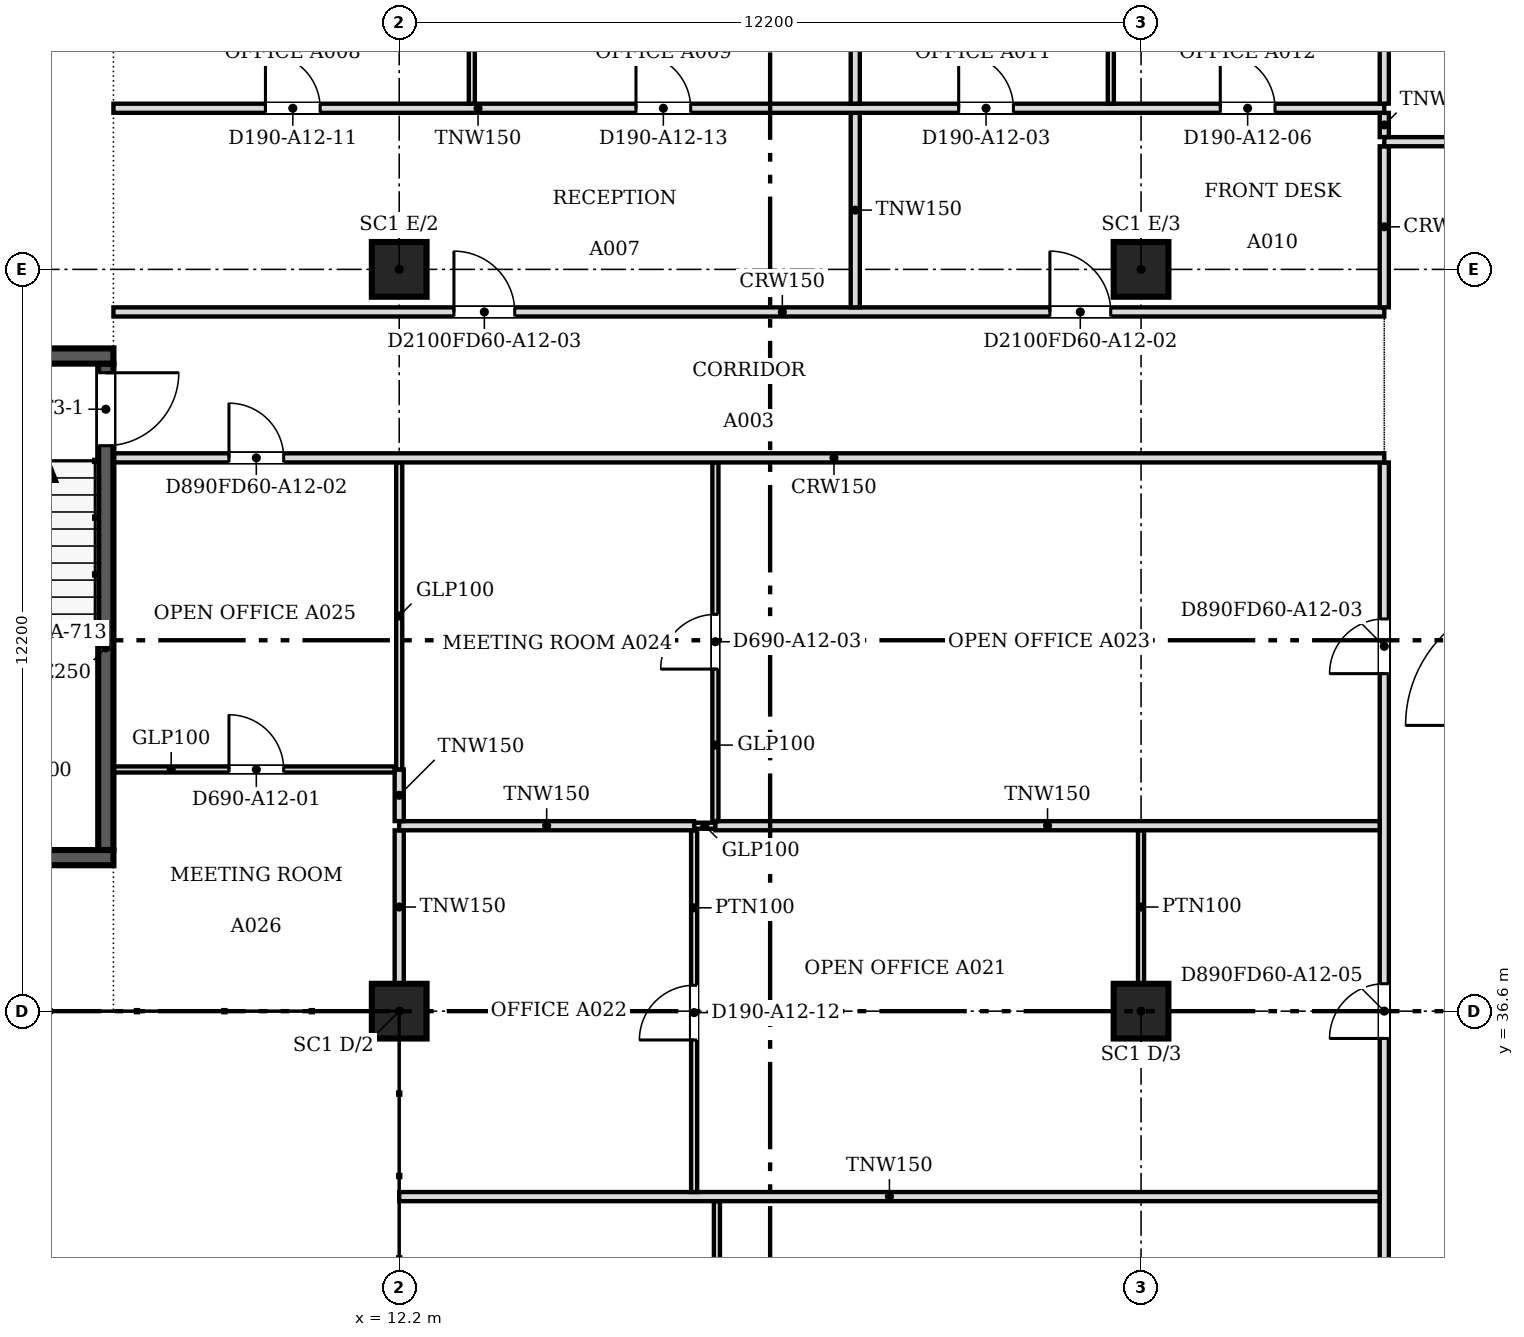
"""IFC4 building model, lengths in metres.
Left out: names, types, materials, properties, quantities, classifications, styles, units other than length and angle.
Written with IfcOpenShell. Run it as: python <this file> out.ifc"""

import sys

from ifc_helpers import new_model, si_unit, direction, frame, frame_2d, origin, origin_2d, place, context, subcontext, project, spatial, rectangle, extrude, source, transform, mapped, element, fill, save


model = new_model("IFC4")
c1 = context("Model", 3, precision=1e-05, world=origin(), true_north=direction((0.0, 1.0)))
c2 = subcontext(c1, "Body", "Model", "MODEL_VIEW")
j1 = project(units=[si_unit("LENGTHUNIT", "METRE"), si_unit("PLANEANGLEUNIT", "RADIAN")], contexts=[c1])
p1 = place(None, origin())
s1 = spatial("IfcSite", under=j1, at=p1, CompositionType="ELEMENT")
p2 = place(p1, origin())
s2 = spatial("IfcBuilding", under=s1, at=p2, CompositionType="ELEMENT")
p3 = place(p2, frame((0.0, 0.0, 135.4)))
s3 = spatial("IfcBuildingStorey", under=s2, at=p3, CompositionType="ELEMENT", Elevation=135.4)
for number, where, z_axis, x_axis in (
    (1, (12.2, 36.6, 0.0), (0.0, 0.0, 1.0), (1.0, 0.0, 0.0)),
    (2, (12.2, 48.8, 0.0), (0.0, 0.0, 1.0), (1.0, 0.0, 0.0)),
    (3, (24.4, 36.6, 0.0), (0.0, 0.0, 1.0), (1.0, 0.0, 0.0)),
    (4, (24.4, 48.8, 0.0), (0.0, 0.0, 1.0), (1.0, 0.0, 0.0)),
):
    element("IfcColumn", number, at=place(p3, frame(where, z_axis=z_axis, x_axis=x_axis)), inside=s3, PredefinedType="COLUMN", context=c2, shape_type="SweptSolid", body=[
        extrude(rectangle(XDim=0.9, YDim=0.9, at=origin_2d()), origin(), (0.0, 0.0, 1.0), 3.6),
    ])
for number, where, z_axis, x_axis in (
    (5, (7.5, 39.125, 0.0), (0.0, 0.0, 1.0), (-1.0, 0.0, 0.0)),
    (6, (3.6, 47.375, 0.0), (0.0, 0.0, 1.0), (1.0, 0.0, 0.0)),
):
    element("IfcWall", number, at=place(p3, frame(where, z_axis=z_axis, x_axis=x_axis)), inside=s3, PredefinedType="SOLIDWALL", context=c2, shape_type="SweptSolid", body=[
        extrude(rectangle(XDim=3.9, YDim=0.25, at=frame_2d((1.95, 0.0))), origin(), (0.0, 0.0, 1.0), 3.8),
    ])
p4 = place(p3, frame((7.375, 47.25, 0.0), z_axis=(0.0, 0.0, 1.0), x_axis=(0.0, -1.0, 0.0)))
e7 = element("IfcWall", 7, at=p4, inside=s3, PredefinedType="SOLIDWALL", context=c2, shape_type="SweptSolid", body=[
    extrude(rectangle(XDim=8.0, YDim=0.25, at=frame_2d((4.0, 0.0))), origin(), (0.0, 0.0, 1.0), 3.8),
])
m1 = source(origin(), c2, "Body", "SweptSolid", [
    extrude(rectangle(XDim=1.2, YDim=2.1, at=frame_2d((0.6, 1.05))), frame((0.0, 0.135, 0.0), z_axis=(0.0, -1.0, 0.0), x_axis=(1.0, 0.0, 0.0)), (0.0, 0.0, 1.0), 0.27),
])
p5 = place(p4, frame((0.15, 0.0, 0.0)))
e8 = element("IfcOpeningElement", 8, at=p5, cuts=e7, PredefinedType="OPENING", context=c2, shape_type="MappedRepresentation", body=[
    mapped(m1, transform((0.0, 0.0, 0.0), scale=1.0)),
])
p6 = place(p3, frame((28.4, 18.8, 0.0), z_axis=(0.0, 0.0, 1.0), x_axis=(0.0, 1.0, 0.0)))
e9 = element("IfcWall", 9, at=p6, inside=s3, PredefinedType="PARTITIONING", context=c2, shape_type="SweptSolid", body=[
    extrude(rectangle(XDim=26.824, YDim=0.15, at=frame_2d((13.412, 0.0))), origin(), (0.0, 0.0, 1.0), 3.067),
])
m2 = source(origin(), c2, "Body", "SweptSolid", [
    extrude(rectangle(XDim=0.9, YDim=2.1, at=frame_2d((0.45, 1.05))), frame((0.0, 0.085, 0.0), z_axis=(0.0, -1.0, 0.0), x_axis=(1.0, 0.0, 0.0)), (0.0, 0.0, 1.0), 0.17),
])
p7 = place(p6, frame((1.3, 0.0, 0.0)))
e10 = element("IfcOpeningElement", 10, at=p7, cuts=e9, PredefinedType="OPENING", context=c2, shape_type="MappedRepresentation", body=[
    mapped(m2, transform((0.0, 0.0, 0.0), scale=1.0)),
])
p8 = place(p6, frame((23.351, 0.0, 0.0)))
e11 = element("IfcOpeningElement", 11, at=p8, cuts=e9, PredefinedType="OPENING", context=c2, shape_type="MappedRepresentation", body=[
    mapped(m2, transform((0.0, 0.0, 0.0), scale=1.0)),
])
p9 = place(p6, frame((17.351, 0.0, 0.0)))
e12 = element("IfcOpeningElement", 12, at=p9, cuts=e9, PredefinedType="OPENING", context=c2, shape_type="MappedRepresentation", body=[
    mapped(m2, transform((0.0, 0.0, 0.0), scale=1.0)),
])
p10 = place(p6, frame((9.7, 0.0, 0.0)))
e13 = element("IfcOpeningElement", 13, at=p10, cuts=e9, PredefinedType="OPENING", context=c2, shape_type="MappedRepresentation", body=[
    mapped(m2, transform((0.0, 0.0, 0.0), scale=1.0)),
])
p11 = place(p3, frame((17.425, 28.871, 0.0), z_axis=(0.0, 0.0, 1.0), x_axis=(0.0, 1.0, 0.0)))
e14 = element("IfcWall", 14, at=p11, inside=s3, PredefinedType="PARTITIONING", context=c2, shape_type="SweptSolid", body=[
    extrude(rectangle(XDim=4.603, YDim=0.1, at=frame_2d((2.301, 0.0))), origin(), (0.0, 0.0, 1.0), 3.067),
])
m3 = source(origin(), c2, "Body", "SweptSolid", [
    extrude(rectangle(XDim=0.9, YDim=2.1, at=frame_2d((0.45, 1.05))), frame((0.0, 0.06, 0.0), z_axis=(0.0, -1.0, 0.0), x_axis=(1.0, 0.0, 0.0)), (0.0, 0.0, 1.0), 0.12),
])
p12 = place(p11, frame((1.9, 0.0, 0.0)))
e15 = element("IfcOpeningElement", 15, at=p12, cuts=e14, PredefinedType="OPENING", context=c2, shape_type="MappedRepresentation", body=[
    mapped(m3, transform((0.0, 0.0, 0.0), scale=1.0)),
])
p13 = place(p3, frame((12.2, 33.55, 0.0), z_axis=(0.0, 0.0, 1.0), x_axis=(1.0, 0.0, 0.0)))
e16 = element("IfcWall", 16, at=p13, inside=s3, PredefinedType="PARTITIONING", context=c2, shape_type="SweptSolid", body=[
    extrude(rectangle(XDim=16.124, YDim=0.15, at=frame_2d((8.062, 0.0))), origin(), (0.0, 0.0, 1.0), 3.067),
])
p14 = place(p3, frame((17.05, 33.626, 0.0), z_axis=(0.0, 0.0, 1.0), x_axis=(0.0, 1.0, 0.0)))
e17 = element("IfcWall", 17, at=p14, inside=s3, PredefinedType="PARTITIONING", context=c2, shape_type="SweptSolid", body=[
    extrude(rectangle(XDim=5.948, YDim=0.1, at=frame_2d((2.974, 0.0))), origin(), (0.0, 0.0, 1.0), 3.067),
])
p15 = place(p14, frame((2.5, 0.0, 0.0)))
e18 = element("IfcOpeningElement", 18, at=p15, cuts=e17, PredefinedType="OPENING", context=c2, shape_type="MappedRepresentation", body=[
    mapped(m3, transform((0.0, 0.0, 0.0), scale=1.0)),
])
p16 = place(p3, frame((12.2, 37.051, 0.0), z_axis=(0.0, 0.0, 1.0), x_axis=(0.0, 1.0, 0.0)))
e19 = element("IfcWall", 19, at=p16, inside=s3, PredefinedType="PARTITIONING", context=c2, shape_type="SweptSolid", body=[
    extrude(rectangle(XDim=2.523, YDim=0.15, at=frame_2d((1.261, 0.0))), origin(), (0.0, 0.0, 1.0), 3.067),
])
p17 = place(p3, frame((24.4, 37.05, 0.0), z_axis=(0.0, 0.0, 1.0), x_axis=(0.0, 1.0, 0.0)))
e20 = element("IfcWall", 20, at=p17, inside=s3, PredefinedType="PARTITIONING", context=c2, shape_type="SweptSolid", body=[
    extrude(rectangle(XDim=2.525, YDim=0.1, at=frame_2d((1.262, 0.0))), origin(), (0.0, 0.0, 1.0), 3.067),
])
p18 = place(p3, frame((12.2, 39.65, 0.0), z_axis=(0.0, 0.0, 1.0), x_axis=(1.0, 0.0, 0.0)))
e21 = element("IfcWall", 21, at=p18, inside=s3, PredefinedType="PARTITIONING", context=c2, shape_type="SweptSolid", body=[
    extrude(rectangle(XDim=4.85, YDim=0.15, at=frame_2d((2.425, 0.0))), origin(), (0.0, 0.0, 1.0), 3.067),
])
p19 = place(p3, frame((17.051, 39.65, 0.0), z_axis=(0.0, 0.0, 1.0), x_axis=(1.0, 0.0, 0.0)))
e22 = element("IfcWall", 22, at=p19, inside=s3, PredefinedType="PARTITIONING", context=c2, shape_type="SweptSolid", body=[
    extrude(rectangle(XDim=0.348, YDim=0.1, at=frame_2d((0.174, 0.0))), origin(), (0.0, 0.0, 1.0), 3.067),
])
p20 = place(p3, frame((17.4, 39.65, 0.0), z_axis=(0.0, 0.0, 1.0), x_axis=(1.0, 0.0, 0.0)))
e23 = element("IfcWall", 23, at=p20, inside=s3, PredefinedType="PARTITIONING", context=c2, shape_type="SweptSolid", body=[
    extrude(rectangle(XDim=10.924, YDim=0.15, at=frame_2d((5.462, 0.0))), origin(), (0.0, 0.0, 1.0), 3.067),
])
p21 = place(p3, frame((12.2, 39.726, 0.0), z_axis=(0.0, 0.0, 1.0), x_axis=(0.0, 1.0, 0.0)))
e24 = element("IfcWall", 24, at=p21, inside=s3, PredefinedType="PARTITIONING", context=c2, shape_type="SweptSolid", body=[
    extrude(rectangle(XDim=0.849, YDim=0.15, at=frame_2d((0.424, 0.0))), origin(), (0.0, 0.0, 1.0), 3.067),
])
p22 = place(p3, frame((17.4, 39.726, 0.0), z_axis=(0.0, 0.0, 1.0), x_axis=(0.0, 1.0, 0.0)))
e25 = element("IfcWall", 25, at=p22, inside=s3, PredefinedType="PARTITIONING", context=c2, shape_type="SweptSolid", body=[
    extrude(rectangle(XDim=5.898, YDim=0.1, at=frame_2d((2.949, 0.0))), origin(), (0.0, 0.0, 1.0), 3.067),
])
p23 = place(p22, frame((2.5, 0.0, 0.0)))
e26 = element("IfcOpeningElement", 26, at=p23, cuts=e25, PredefinedType="OPENING", context=c2, shape_type="MappedRepresentation", body=[
    mapped(m3, transform((0.0, 0.0, 0.0), scale=1.0)),
])
p24 = place(p3, frame((12.124, 40.575, 0.0), z_axis=(0.0, 0.0, 1.0), x_axis=(-1.0, 0.0, 0.0)))
e27 = element("IfcWall", 27, at=p24, inside=s3, PredefinedType="PARTITIONING", context=c2, shape_type="SweptSolid", body=[
    extrude(rectangle(XDim=4.624, YDim=0.1, at=frame_2d((2.312, 0.0))), origin(), (0.0, 0.0, 1.0), 3.067),
])
p25 = place(p24, frame((1.824, 0.0, 0.0)))
e28 = element("IfcOpeningElement", 28, at=p25, cuts=e27, PredefinedType="OPENING", context=c2, shape_type="MappedRepresentation", body=[
    mapped(m3, transform((0.0, 0.0, 0.0), scale=1.0)),
])
p26 = place(p3, frame((12.2, 40.576, 0.0), z_axis=(0.0, 0.0, 1.0), x_axis=(0.0, 1.0, 0.0)))
e29 = element("IfcWall", 29, at=p26, inside=s3, PredefinedType="PARTITIONING", context=c2, shape_type="SweptSolid", body=[
    extrude(rectangle(XDim=5.048, YDim=0.1, at=frame_2d((2.524, 0.0))), origin(), (0.0, 0.0, 1.0), 3.067),
])
p27 = place(p3, frame((28.4, 45.7, 0.0), z_axis=(0.0, 0.0, 1.0), x_axis=(-1.0, 0.0, 0.0)))
e30 = element("IfcWall", 30, at=p27, inside=s3, PredefinedType="PARTITIONING", context=c2, shape_type="SweptSolid", body=[
    extrude(rectangle(XDim=20.9, YDim=0.15, at=frame_2d((10.45, 0.0))), origin(), (0.0, 0.0, 1.0), 3.067),
])
p28 = place(p27, frame((18.1, 0.0, 0.0)))
e31 = element("IfcOpeningElement", 31, at=p28, cuts=e30, PredefinedType="OPENING", context=c2, shape_type="MappedRepresentation", body=[
    mapped(m2, transform((0.0, 0.0, 0.0), scale=1.0)),
])
p29 = place(p3, frame((7.5, 48.1, 0.0), z_axis=(0.0, 0.0, 1.0), x_axis=(1.0, 0.0, 0.0)))
e32 = element("IfcWall", 32, at=p29, inside=s3, PredefinedType="PARTITIONING", context=c2, shape_type="SweptSolid", body=[
    extrude(rectangle(XDim=20.9, YDim=0.15, at=frame_2d((10.45, 0.0))), origin(), (0.0, 0.0, 1.0), 3.067),
])
m4 = source(origin(), c2, "Body", "SweptSolid", [
    extrude(rectangle(XDim=1.0, YDim=2.1, at=frame_2d((0.5, 1.05))), frame((0.0, 0.085, 0.0), z_axis=(0.0, -1.0, 0.0), x_axis=(1.0, 0.0, 0.0)), (0.0, 0.0, 1.0), 0.17),
])
p30 = place(p29, frame((15.401, 0.0, 0.0)))
e33 = element("IfcOpeningElement", 33, at=p30, cuts=e32, PredefinedType="OPENING", context=c2, shape_type="MappedRepresentation", body=[
    mapped(m4, transform((0.0, 0.0, 0.0), scale=1.0)),
])
p31 = place(p29, frame((5.6, 0.0, 0.0)))
e34 = element("IfcOpeningElement", 34, at=p31, cuts=e32, PredefinedType="OPENING", context=c2, shape_type="MappedRepresentation", body=[
    mapped(m4, transform((0.0, 0.0, 0.0), scale=1.0)),
])
p32 = place(p3, frame((19.7, 48.176, 0.0), z_axis=(0.0, 0.0, 1.0), x_axis=(0.0, 1.0, 0.0)))
e35 = element("IfcWall", 35, at=p32, inside=s3, PredefinedType="PARTITIONING", context=c2, shape_type="SweptSolid", body=[
    extrude(rectangle(XDim=3.198, YDim=0.15, at=frame_2d((1.599, 0.0))), origin(), (0.0, 0.0, 1.0), 3.067),
])
p33 = place(p3, frame((28.4, 48.176, 0.0), z_axis=(0.0, 0.0, 1.0), x_axis=(0.0, 1.0, 0.0)))
e36 = element("IfcWall", 36, at=p33, inside=s3, PredefinedType="PARTITIONING", context=c2, shape_type="SweptSolid", body=[
    extrude(rectangle(XDim=2.648, YDim=0.15, at=frame_2d((1.324, 0.0))), origin(), (0.0, 0.0, 1.0), 3.067),
])
p34 = place(p3, frame((28.4, 50.9, 0.0), z_axis=(0.0, 0.0, 1.0), x_axis=(1.0, 0.0, 0.0)))
e37 = element("IfcWall", 37, at=p34, inside=s3, PredefinedType="PARTITIONING", context=c2, shape_type="SweptSolid", body=[
    extrude(rectangle(XDim=31.254, YDim=0.15, at=frame_2d((15.627, 0.0))), origin(), (0.0, 0.0, 1.0), 3.067),
])
p35 = place(p34, frame((5.6, 0.0, 0.0)))
e38 = element("IfcOpeningElement", 38, at=p35, cuts=e37, PredefinedType="OPENING", context=c2, shape_type="MappedRepresentation", body=[
    mapped(m2, transform((0.0, 0.0, 0.0), scale=1.0)),
])
p36 = place(p34, frame((21.3, 0.0, 0.0)))
e39 = element("IfcOpeningElement", 39, at=p36, cuts=e37, PredefinedType="OPENING", context=c2, shape_type="MappedRepresentation", body=[
    mapped(m2, transform((0.0, 0.0, 0.0), scale=1.0)),
])
p37 = place(p3, frame((28.4, 50.976, 0.0), z_axis=(0.0, 0.0, 1.0), x_axis=(0.0, 1.0, 0.0)))
e40 = element("IfcWall", 40, at=p37, inside=s3, PredefinedType="PARTITIONING", context=c2, shape_type="SweptSolid", body=[
    extrude(rectangle(XDim=0.398, YDim=0.15, at=frame_2d((0.199, 0.0))), origin(), (0.0, 0.0, 1.0), 3.067),
])
p38 = place(p3, frame((7.5, 51.45, 0.0), z_axis=(0.0, 0.0, 1.0), x_axis=(1.0, 0.0, 0.0)))
e41 = element("IfcWall", 41, at=p38, inside=s3, PredefinedType="PARTITIONING", context=c2, shape_type="SweptSolid", body=[
    extrude(rectangle(XDim=20.9, YDim=0.15, at=frame_2d((10.45, 0.0))), origin(), (0.0, 0.0, 1.0), 3.067),
])
p39 = place(p38, frame((13.901, 0.0, 0.0)))
e42 = element("IfcOpeningElement", 42, at=p39, cuts=e41, PredefinedType="OPENING", context=c2, shape_type="MappedRepresentation", body=[
    mapped(m2, transform((0.0, 0.0, 0.0), scale=1.0)),
])
p40 = place(p38, frame((18.203, 0.0, 0.0)))
e43 = element("IfcOpeningElement", 43, at=p40, cuts=e41, PredefinedType="OPENING", context=c2, shape_type="MappedRepresentation", body=[
    mapped(m2, transform((0.0, 0.0, 0.0), scale=1.0)),
])
p41 = place(p38, frame((2.5, 0.0, 0.0)))
e44 = element("IfcOpeningElement", 44, at=p41, cuts=e41, PredefinedType="OPENING", context=c2, shape_type="MappedRepresentation", body=[
    mapped(m2, transform((0.0, 0.0, 0.0), scale=1.0)),
])
p42 = place(p38, frame((8.594, 0.0, 0.0)))
e45 = element("IfcOpeningElement", 45, at=p42, cuts=e41, PredefinedType="OPENING", context=c2, shape_type="MappedRepresentation", body=[
    mapped(m2, transform((0.0, 0.0, 0.0), scale=1.0)),
])
p43 = place(p3, frame((13.394, 51.526, 0.0), z_axis=(0.0, 0.0, 1.0), x_axis=(0.0, 1.0, 0.0)))
e46 = element("IfcWall", 46, at=p43, inside=s3, PredefinedType="PARTITIONING", context=c2, shape_type="SweptSolid", body=[
    extrude(rectangle(XDim=2.874, YDim=0.1, at=frame_2d((1.437, 0.0))), origin(), (0.0, 0.0, 1.0), 3.067),
])
p44 = place(p3, frame((19.7, 51.526, 0.0), z_axis=(0.0, 0.0, 1.0), x_axis=(0.0, 1.0, 0.0)))
e47 = element("IfcWall", 47, at=p44, inside=s3, PredefinedType="PARTITIONING", context=c2, shape_type="SweptSolid", body=[
    extrude(rectangle(XDim=2.874, YDim=0.15, at=frame_2d((1.437, 0.0))), origin(), (0.0, 0.0, 1.0), 3.067),
])
p45 = place(p3, frame((23.903, 51.526, 0.0), z_axis=(0.0, 0.0, 1.0), x_axis=(0.0, 1.0, 0.0)))
e48 = element("IfcWall", 48, at=p45, inside=s3, PredefinedType="PARTITIONING", context=c2, shape_type="SweptSolid", body=[
    extrude(rectangle(XDim=2.874, YDim=0.1, at=frame_2d((1.437, 0.0))), origin(), (0.0, 0.0, 1.0), 3.067),
])
p46 = place(p3, frame((28.4, 51.526, 0.0), z_axis=(0.0, 0.0, 1.0), x_axis=(0.0, 1.0, 0.0)))
e49 = element("IfcWall", 49, at=p46, inside=s3, PredefinedType="PARTITIONING", context=c2, shape_type="SweptSolid", body=[
    extrude(rectangle(XDim=2.874, YDim=0.15, at=frame_2d((1.437, 0.0))), origin(), (0.0, 0.0, 1.0), 3.067),
])
m5 = source(origin(), c2, "Body", "SweptSolid", [
    extrude(rectangle(XDim=1.2, YDim=2.1, at=frame_2d((0.6, 1.05))), frame((0.0, 0.025, 0.0), z_axis=(0.0, -1.0, 0.0), x_axis=(1.0, 0.0, 0.0)), (0.0, 0.0, 1.0), 0.05),
])
p47 = place(p5, origin())
e50 = element("IfcDoor", 50, at=p47, inside=s3, OperationType="SINGLE_SWING_LEFT", PredefinedType="DOOR", context=c2, shape_type="MappedRepresentation", body=[
    mapped(m5, transform((0.0, 0.0, 0.0), scale=1.0)),
])
fill(e8, e50)
m6 = source(origin(), c2, "Body", "SweptSolid", [
    extrude(rectangle(XDim=0.9, YDim=2.1, at=frame_2d((0.45, 1.05))), frame((0.0, 0.025, 0.0), z_axis=(0.0, -1.0, 0.0), x_axis=(1.0, 0.0, 0.0)), (0.0, 0.0, 1.0), 0.05),
])
p48 = place(p39, origin())
e51 = element("IfcDoor", 51, at=p48, inside=s3, OperationType="SINGLE_SWING_LEFT", PredefinedType="DOOR", context=c2, shape_type="MappedRepresentation", body=[
    mapped(m6, transform((0.0, 0.0, 0.0), scale=1.0)),
])
fill(e42, e51)
p49 = place(p40, origin())
e52 = element("IfcDoor", 52, at=p49, inside=s3, OperationType="SINGLE_SWING_LEFT", PredefinedType="DOOR", context=c2, shape_type="MappedRepresentation", body=[
    mapped(m6, transform((0.0, 0.0, 0.0), scale=1.0)),
])
fill(e43, e52)
p50 = place(p25, origin())
e53 = element("IfcDoor", 53, at=p50, inside=s3, OperationType="SINGLE_SWING_RIGHT", PredefinedType="DOOR", context=c2, shape_type="MappedRepresentation", body=[
    mapped(m6, transform((0.0, 0.0, 0.0), scale=1.0)),
])
fill(e28, e53)
p51 = place(p28, origin())
e54 = element("IfcDoor", 54, at=p51, inside=s3, OperationType="SINGLE_SWING_RIGHT", PredefinedType="DOOR", context=c2, shape_type="MappedRepresentation", body=[
    mapped(m6, transform((0.0, 0.0, 0.0), scale=1.0)),
])
fill(e31, e54)
p52 = place(p41, origin())
e55 = element("IfcDoor", 55, at=p52, inside=s3, OperationType="SINGLE_SWING_LEFT", PredefinedType="DOOR", context=c2, shape_type="MappedRepresentation", body=[
    mapped(m6, transform((0.0, 0.0, 0.0), scale=1.0)),
])
fill(e44, e55)
p53 = place(p23, origin())
e56 = element("IfcDoor", 56, at=p53, inside=s3, OperationType="SINGLE_SWING_LEFT", PredefinedType="DOOR", context=c2, shape_type="MappedRepresentation", body=[
    mapped(m6, transform((0.0, 0.0, 0.0), scale=1.0)),
])
fill(e26, e56)
p54 = place(p15, origin())
e57 = element("IfcDoor", 57, at=p54, inside=s3, OperationType="SINGLE_SWING_LEFT", PredefinedType="DOOR", context=c2, shape_type="MappedRepresentation", body=[
    mapped(m6, transform((0.0, 0.0, 0.0), scale=1.0)),
])
fill(e18, e57)
p55 = place(p8, origin())
e58 = element("IfcDoor", 58, at=p55, inside=s3, OperationType="SINGLE_SWING_LEFT", PredefinedType="DOOR", context=c2, shape_type="MappedRepresentation", body=[
    mapped(m6, transform((0.0, 0.0, 0.0), scale=1.0)),
])
fill(e11, e58)
p56 = place(p9, origin())
e59 = element("IfcDoor", 59, at=p56, inside=s3, OperationType="SINGLE_SWING_LEFT", PredefinedType="DOOR", context=c2, shape_type="MappedRepresentation", body=[
    mapped(m6, transform((0.0, 0.0, 0.0), scale=1.0)),
])
fill(e12, e59)
p57 = place(p42, origin())
e60 = element("IfcDoor", 60, at=p57, inside=s3, OperationType="SINGLE_SWING_LEFT", PredefinedType="DOOR", context=c2, shape_type="MappedRepresentation", body=[
    mapped(m6, transform((0.0, 0.0, 0.0), scale=1.0)),
])
fill(e45, e60)
m7 = source(origin(), c2, "Body", "SweptSolid", [
    extrude(rectangle(XDim=1.0, YDim=2.1, at=frame_2d((0.5, 1.05))), frame((0.0, 0.025, 0.0), z_axis=(0.0, -1.0, 0.0), x_axis=(1.0, 0.0, 0.0)), (0.0, 0.0, 1.0), 0.05),
])
p58 = place(p30, origin())
e61 = element("IfcDoor", 61, at=p58, inside=s3, OperationType="SINGLE_SWING_LEFT", PredefinedType="DOOR", context=c2, shape_type="MappedRepresentation", body=[
    mapped(m7, transform((0.0, 0.0, 0.0), scale=1.0)),
])
fill(e33, e61)
p59 = place(p31, origin())
e62 = element("IfcDoor", 62, at=p59, inside=s3, OperationType="SINGLE_SWING_LEFT", PredefinedType="DOOR", context=c2, shape_type="MappedRepresentation", body=[
    mapped(m7, transform((0.0, 0.0, 0.0), scale=1.0)),
])
fill(e34, e62)
save(model, sys.argv[1])
